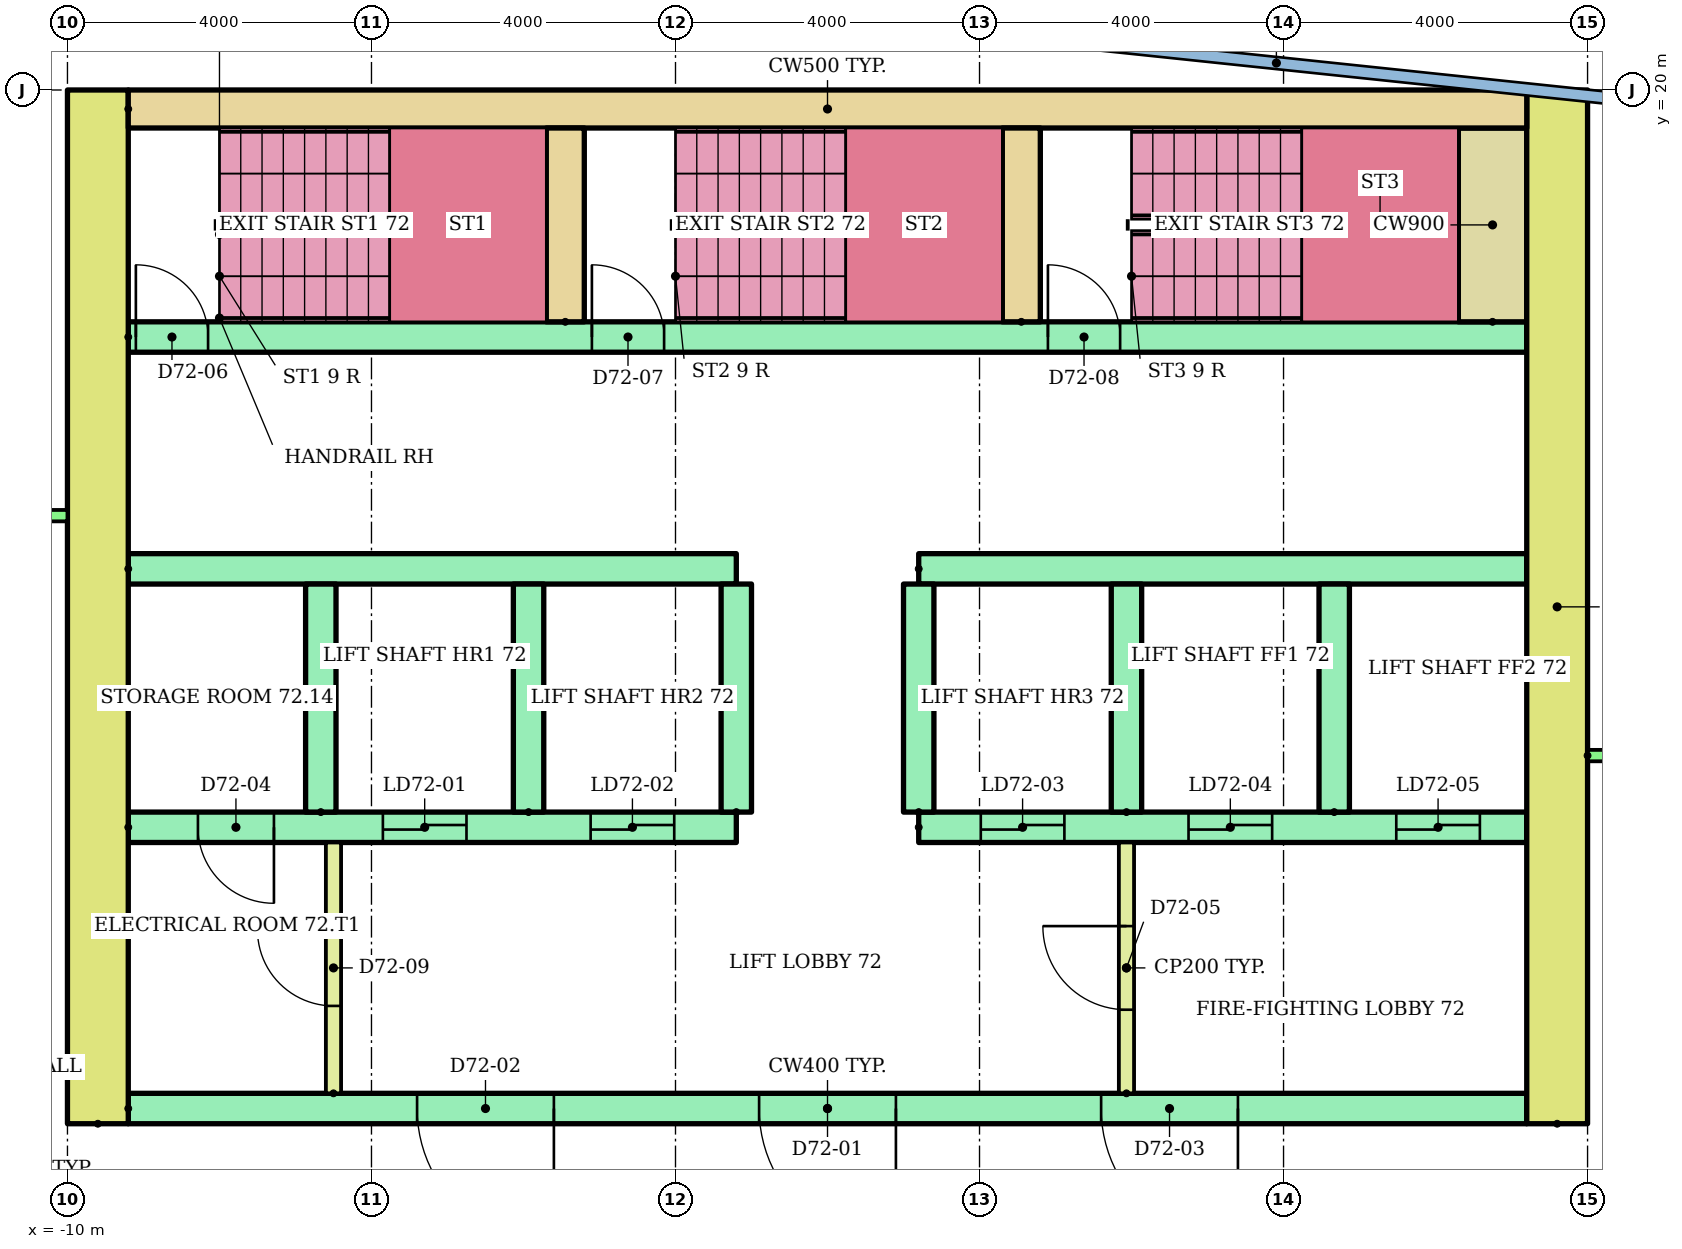
"""IFC4 building model, lengths in metres.
Left out: names, types, materials, properties, quantities, classifications, styles, units other than length and angle.
Written with IfcOpenShell. Run it as: python <this file> out.ifc"""

import sys

from ifc_helpers import new_model, si_unit, direction, frame, frame_2d, origin, place, context, subcontext, project, spatial, rectangle, extrude, element, fill, save


model = new_model("IFC4")
c1 = context("Model", 3, precision=1e-05, world=origin(), true_north=direction((0.0, 1.0)))
c2 = subcontext(c1, "Body", "Model", "MODEL_VIEW")
j1 = project(units=[si_unit("LENGTHUNIT", "METRE"), si_unit("PLANEANGLEUNIT", "RADIAN")], contexts=[c1])
p1 = place(None, origin())
s1 = spatial("IfcSite", under=j1, at=p1, CompositionType="ELEMENT")
p2 = place(p1, origin())
s2 = spatial("IfcBuilding", under=s1, at=p2, CompositionType="ELEMENT")
p3 = place(p2, frame((0.0, 0.0, 275.5)))
s3 = spatial("IfcBuildingStorey", under=s2, at=p3, CompositionType="ELEMENT", Elevation=275.5)
for number, where, z_axis, x_axis in (
    (1, (-9.6, 6.4, 0.0), (0.0, 0.0, 1.0), (0.0, 1.0, 0.0)),
    (2, (9.6, 6.4, 0.0), (0.0, 0.0, 1.0), (0.0, 1.0, 0.0)),
):
    element("IfcWall", number, at=place(p3, frame(where, z_axis=z_axis, x_axis=x_axis)), inside=s3, PredefinedType="SHEAR", context=c2, shape_type="SweptSolid", body=[
        extrude(rectangle(XDim=13.6, YDim=0.8, at=frame_2d((6.8, 0.0))), origin(), (0.0, 0.0, 1.0), 2.92),
    ])
p4 = place(p3, frame((-9.2, 19.75, 0.0)))
e3 = element("IfcWall", 3, at=p4, inside=s3, PredefinedType="SHEAR", context=c2, shape_type="SweptSolid", body=[
    extrude(rectangle(XDim=18.4, YDim=0.5, at=frame_2d((9.2, 0.0))), origin(), (0.0, 0.0, 1.0), 2.92),
])
p5 = place(p3, frame((-9.2, 6.6, 0.0)))
e4 = element("IfcWall", 4, at=p5, inside=s3, PredefinedType="SHEAR", context=c2, shape_type="SweptSolid", body=[
    extrude(rectangle(XDim=18.4, YDim=0.4, at=frame_2d((9.2, 0.0))), origin(), (0.0, 0.0, 1.0), 2.92),
])
p6 = place(p5, frame((8.3, 0.0, 0.0)))
e5 = element("IfcOpeningElement", 5, at=p6, cuts=e4, PredefinedType="OPENING", context=c2, shape_type="SweptSolid", body=[
    extrude(rectangle(XDim=1.8, YDim=2.1, at=frame_2d((0.9, 1.05))), frame((0.0, 0.21, 0.0), z_axis=(0.0, -1.0, 0.0), x_axis=(1.0, 0.0, 0.0)), (0.0, 0.0, 1.0), 0.42),
])
p7 = place(p5, frame((3.8, 0.0, 0.0)))
e6 = element("IfcOpeningElement", 6, at=p7, cuts=e4, PredefinedType="OPENING", context=c2, shape_type="SweptSolid", body=[
    extrude(rectangle(XDim=1.8, YDim=2.1, at=frame_2d((0.9, 1.05))), frame((0.0, 0.21, 0.0), z_axis=(0.0, -1.0, 0.0), x_axis=(1.0, 0.0, 0.0)), (0.0, 0.0, 1.0), 0.42),
])
p8 = place(p5, frame((12.8, 0.0, 0.0)))
e7 = element("IfcOpeningElement", 7, at=p8, cuts=e4, PredefinedType="OPENING", context=c2, shape_type="SweptSolid", body=[
    extrude(rectangle(XDim=1.8, YDim=2.1, at=frame_2d((0.9, 1.05))), frame((0.0, 0.21, 0.0), z_axis=(0.0, -1.0, 0.0), x_axis=(1.0, 0.0, 0.0)), (0.0, 0.0, 1.0), 0.42),
])
p9 = place(p3, frame((-9.2, 10.3, 0.0)))
e8 = element("IfcWall", 8, at=p9, inside=s3, PredefinedType="SHEAR", context=c2, shape_type="SweptSolid", body=[
    extrude(rectangle(XDim=8.0, YDim=0.4, at=frame_2d((4.0, 0.0))), origin(), (0.0, 0.0, 1.0), 2.92),
])
p10 = place(p9, frame((3.35, 0.0, 0.0)))
e9 = element("IfcOpeningElement", 9, at=p10, cuts=e8, PredefinedType="OPENING", context=c2, shape_type="SweptSolid", body=[
    extrude(rectangle(XDim=1.1, YDim=2.1, at=frame_2d((0.55, 1.05))), frame((0.0, 0.21, 0.0), z_axis=(0.0, -1.0, 0.0), x_axis=(1.0, 0.0, 0.0)), (0.0, 0.0, 1.0), 0.42),
])
p11 = place(p9, frame((6.083, 0.0, 0.0)))
e10 = element("IfcOpeningElement", 10, at=p11, cuts=e8, PredefinedType="OPENING", context=c2, shape_type="SweptSolid", body=[
    extrude(rectangle(XDim=1.1, YDim=2.1, at=frame_2d((0.55, 1.05))), frame((0.0, 0.21, 0.0), z_axis=(0.0, -1.0, 0.0), x_axis=(1.0, 0.0, 0.0)), (0.0, 0.0, 1.0), 0.42),
])
p12 = place(p9, frame((0.917, 0.0, 0.0)))
e11 = element("IfcOpeningElement", 11, at=p12, cuts=e8, PredefinedType="OPENING", context=c2, shape_type="SweptSolid", body=[
    extrude(rectangle(XDim=1.0, YDim=2.1, at=frame_2d((0.5, 1.05))), frame((0.0, 0.21, 0.0), z_axis=(0.0, -1.0, 0.0), x_axis=(1.0, 0.0, 0.0)), (0.0, 0.0, 1.0), 0.42),
])
p13 = place(p3, frame((-9.2, 13.7, 0.0)))
e12 = element("IfcWall", 12, at=p13, inside=s3, PredefinedType="SHEAR", context=c2, shape_type="SweptSolid", body=[
    extrude(rectangle(XDim=8.0, YDim=0.4, at=frame_2d((4.0, 0.0))), origin(), (0.0, 0.0, 1.0), 2.92),
])
p14 = place(p3, frame((1.2, 10.3, 0.0)))
e13 = element("IfcWall", 13, at=p14, inside=s3, PredefinedType="SHEAR", context=c2, shape_type="SweptSolid", body=[
    extrude(rectangle(XDim=8.0, YDim=0.4, at=frame_2d((4.0, 0.0))), origin(), (0.0, 0.0, 1.0), 2.92),
])
p15 = place(p14, frame((0.817, 0.0, 0.0)))
e14 = element("IfcOpeningElement", 14, at=p15, cuts=e13, PredefinedType="OPENING", context=c2, shape_type="SweptSolid", body=[
    extrude(rectangle(XDim=1.1, YDim=2.1, at=frame_2d((0.55, 1.05))), frame((0.0, 0.21, 0.0), z_axis=(0.0, -1.0, 0.0), x_axis=(1.0, 0.0, 0.0)), (0.0, 0.0, 1.0), 0.42),
])
p16 = place(p14, frame((3.55, 0.0, 0.0)))
e15 = element("IfcOpeningElement", 15, at=p16, cuts=e13, PredefinedType="OPENING", context=c2, shape_type="SweptSolid", body=[
    extrude(rectangle(XDim=1.1, YDim=2.1, at=frame_2d((0.55, 1.05))), frame((0.0, 0.21, 0.0), z_axis=(0.0, -1.0, 0.0), x_axis=(1.0, 0.0, 0.0)), (0.0, 0.0, 1.0), 0.42),
])
p17 = place(p14, frame((6.283, 0.0, 0.0)))
e16 = element("IfcOpeningElement", 16, at=p17, cuts=e13, PredefinedType="OPENING", context=c2, shape_type="SweptSolid", body=[
    extrude(rectangle(XDim=1.1, YDim=2.1, at=frame_2d((0.55, 1.05))), frame((0.0, 0.21, 0.0), z_axis=(0.0, -1.0, 0.0), x_axis=(1.0, 0.0, 0.0)), (0.0, 0.0, 1.0), 0.42),
])
p18 = place(p3, frame((1.2, 13.7, 0.0)))
e17 = element("IfcWall", 17, at=p18, inside=s3, PredefinedType="SHEAR", context=c2, shape_type="SweptSolid", body=[
    extrude(rectangle(XDim=8.0, YDim=0.4, at=frame_2d((4.0, 0.0))), origin(), (0.0, 0.0, 1.0), 2.92),
])
for number, where, z_axis, x_axis in (
    (18, (-6.667, 10.5, 0.0), (0.0, 0.0, 1.0), (0.0, 1.0, 0.0)),
    (19, (-3.933, 10.5, 0.0), (0.0, 0.0, 1.0), (0.0, 1.0, 0.0)),
    (20, (-1.2, 10.5, 0.0), (0.0, 0.0, 1.0), (0.0, 1.0, 0.0)),
    (21, (1.2, 10.5, 0.0), (0.0, 0.0, 1.0), (0.0, 1.0, 0.0)),
    (22, (3.933, 10.5, 0.0), (0.0, 0.0, 1.0), (0.0, 1.0, 0.0)),
    (23, (6.667, 10.5, 0.0), (0.0, 0.0, 1.0), (0.0, 1.0, 0.0)),
):
    element("IfcWall", number, at=place(p3, frame(where, z_axis=z_axis, x_axis=x_axis)), inside=s3, PredefinedType="SHEAR", context=c2, shape_type="SweptSolid", body=[
        extrude(rectangle(XDim=3.0, YDim=0.4, at=frame_2d((1.5, 0.0))), origin(), (0.0, 0.0, 1.0), 2.92),
    ])
p19 = place(p3, frame((3.933, 6.8, 0.0), z_axis=(0.0, 0.0, 1.0), x_axis=(0.0, 1.0, 0.0)))
e24 = element("IfcWall", 24, at=p19, inside=s3, PredefinedType="PARTITIONING", context=c2, shape_type="SweptSolid", body=[
    extrude(rectangle(XDim=3.3, YDim=0.2, at=frame_2d((1.65, 0.0))), origin(), (0.0, 0.0, 1.0), 2.92),
])
p20 = place(p19, frame((1.1, 0.0, 0.0)))
e25 = element("IfcOpeningElement", 25, at=p20, cuts=e24, PredefinedType="OPENING", context=c2, shape_type="SweptSolid", body=[
    extrude(rectangle(XDim=1.1, YDim=2.1, at=frame_2d((0.55, 1.05))), frame((0.0, 0.11, 0.0), z_axis=(0.0, -1.0, 0.0), x_axis=(1.0, 0.0, 0.0)), (0.0, 0.0, 1.0), 0.22),
])
p21 = place(p3, frame((-9.2, 16.75, 0.0)))
e26 = element("IfcWall", 26, at=p21, inside=s3, PredefinedType="SHEAR", context=c2, shape_type="SweptSolid", body=[
    extrude(rectangle(XDim=18.4, YDim=0.4, at=frame_2d((9.2, 0.0))), origin(), (0.0, 0.0, 1.0), 2.92),
])
p22 = place(p21, frame((0.1, 0.0, 0.0)))
e27 = element("IfcOpeningElement", 27, at=p22, cuts=e26, PredefinedType="OPENING", context=c2, shape_type="SweptSolid", body=[
    extrude(rectangle(XDim=0.95, YDim=2.1, at=frame_2d((0.475, 1.05))), frame((0.0, 0.21, 0.0), z_axis=(0.0, -1.0, 0.0), x_axis=(1.0, 0.0, 0.0)), (0.0, 0.0, 1.0), 0.42),
])
p23 = place(p21, frame((6.1, 0.0, 0.0)))
e28 = element("IfcOpeningElement", 28, at=p23, cuts=e26, PredefinedType="OPENING", context=c2, shape_type="SweptSolid", body=[
    extrude(rectangle(XDim=0.95, YDim=2.1, at=frame_2d((0.475, 1.05))), frame((0.0, 0.21, 0.0), z_axis=(0.0, -1.0, 0.0), x_axis=(1.0, 0.0, 0.0)), (0.0, 0.0, 1.0), 0.42),
])
p24 = place(p21, frame((12.1, 0.0, 0.0)))
e29 = element("IfcOpeningElement", 29, at=p24, cuts=e26, PredefinedType="OPENING", context=c2, shape_type="SweptSolid", body=[
    extrude(rectangle(XDim=0.95, YDim=2.1, at=frame_2d((0.475, 1.05))), frame((0.0, 0.21, 0.0), z_axis=(0.0, -1.0, 0.0), x_axis=(1.0, 0.0, 0.0)), (0.0, 0.0, 1.0), 0.42),
])
for number, where, z_axis, x_axis in (
    (30, (-3.45, 16.95, 0.0), (0.0, 0.0, 1.0), (0.0, 1.0, 0.0)),
    (31, (2.55, 16.95, 0.0), (0.0, 0.0, 1.0), (0.0, 1.0, 0.0)),
):
    element("IfcWall", number, at=place(p3, frame(where, z_axis=z_axis, x_axis=x_axis)), inside=s3, PredefinedType="SHEAR", context=c2, shape_type="SweptSolid", body=[
        extrude(rectangle(XDim=2.55, YDim=0.5, at=frame_2d((1.275, 0.0))), origin(), (0.0, 0.0, 1.0), 2.92),
    ])
p25 = place(p3, frame((8.75, 16.95, 0.0), z_axis=(0.0, 0.0, 1.0), x_axis=(0.0, 1.0, 0.0)))
e32 = element("IfcWall", 32, at=p25, inside=s3, PredefinedType="SHEAR", context=c2, shape_type="SweptSolid", body=[
    extrude(rectangle(XDim=2.55, YDim=0.9, at=frame_2d((1.275, 0.0))), origin(), (0.0, 0.0, 1.0), 2.92),
])
p26 = place(p3, frame((-6.5, 6.8, 0.0), z_axis=(0.0, 0.0, 1.0), x_axis=(0.0, 1.0, 0.0)))
e33 = element("IfcWall", 33, at=p26, inside=s3, PredefinedType="PARTITIONING", context=c2, shape_type="SweptSolid", body=[
    extrude(rectangle(XDim=3.3, YDim=0.2, at=frame_2d((1.65, 0.0))), origin(), (0.0, 0.0, 1.0), 2.92),
])
p27 = place(p26, frame((1.15, 0.0, 0.0)))
e34 = element("IfcOpeningElement", 34, at=p27, cuts=e33, PredefinedType="OPENING", context=c2, shape_type="SweptSolid", body=[
    extrude(rectangle(XDim=1.0, YDim=2.1, at=frame_2d((0.5, 1.05))), frame((0.0, 0.11, 0.0), z_axis=(0.0, -1.0, 0.0), x_axis=(1.0, 0.0, 0.0)), (0.0, 0.0, 1.0), 0.22),
])
p28 = place(p3, frame((-21.89, 14.4, 0.0)))
e35 = element("IfcWall", 35, at=p28, inside=s3, PredefinedType="PARTITIONING", context=c2, shape_type="SweptSolid", body=[
    extrude(rectangle(XDim=11.89, YDim=0.15, at=frame_2d((5.945, 0.0))), origin(), (0.0, 0.0, 1.0), 2.4),
])
p29 = place(p28, frame((1.26, 0.0, 0.0)))
e36 = element("IfcOpeningElement", 36, at=p29, cuts=e35, PredefinedType="OPENING", context=c2, shape_type="SweptSolid", body=[
    extrude(rectangle(XDim=1.0, YDim=2.1, at=frame_2d((0.5, 1.05))), frame((0.0, 0.085, 0.0), z_axis=(0.0, -1.0, 0.0), x_axis=(1.0, 0.0, 0.0)), (0.0, 0.0, 1.0), 0.17),
])
p30 = place(p28, frame((8.254, 0.0, 0.0)))
e37 = element("IfcOpeningElement", 37, at=p30, cuts=e35, PredefinedType="OPENING", context=c2, shape_type="SweptSolid", body=[
    extrude(rectangle(XDim=1.0, YDim=2.1, at=frame_2d((0.5, 1.05))), frame((0.0, 0.085, 0.0), z_axis=(0.0, -1.0, 0.0), x_axis=(1.0, 0.0, 0.0)), (0.0, 0.0, 1.0), 0.17),
])
p31 = place(p3, frame((10.0, 11.243, 0.0)))
e38 = element("IfcWall", 38, at=p31, inside=s3, PredefinedType="PARTITIONING", context=c2, shape_type="SweptSolid", body=[
    extrude(rectangle(XDim=22.118, YDim=0.15, at=frame_2d((11.059, 0.0))), origin(), (0.0, 0.0, 1.0), 2.4),
])
p32 = place(p31, frame((7.398, 0.0, 0.0)))
e39 = element("IfcOpeningElement", 39, at=p32, cuts=e38, PredefinedType="OPENING", context=c2, shape_type="SweptSolid", body=[
    extrude(rectangle(XDim=1.0, YDim=2.1, at=frame_2d((0.5, 1.05))), frame((0.0, 0.085, 0.0), z_axis=(0.0, -1.0, 0.0), x_axis=(1.0, 0.0, 0.0)), (0.0, 0.0, 1.0), 0.17),
])
p33 = place(p31, frame((18.477, 0.0, 0.0)))
e40 = element("IfcOpeningElement", 40, at=p33, cuts=e38, PredefinedType="OPENING", context=c2, shape_type="SweptSolid", body=[
    extrude(rectangle(XDim=0.9, YDim=2.1, at=frame_2d((0.45, 1.05))), frame((0.0, 0.085, 0.0), z_axis=(0.0, -1.0, 0.0), x_axis=(1.0, 0.0, 0.0)), (0.0, 0.0, 1.0), 0.17),
])
p34 = place(p6, frame((1.8, 0.0, 0.0), z_axis=(0.0, 0.0, 1.0), x_axis=(-1.0, 0.0, 0.0)))
e41 = element("IfcDoor", 41, at=p34, inside=s3, OperationType="DOUBLE_DOOR_SINGLE_SWING", PredefinedType="DOOR", context=c2, shape_type="SweptSolid", body=[
    extrude(rectangle(XDim=1.8, YDim=2.1, at=frame_2d((0.9, 1.05))), frame((0.0, 0.025, 0.0), z_axis=(0.0, -1.0, 0.0), x_axis=(1.0, 0.0, 0.0)), (0.0, 0.0, 1.0), 0.05),
])
fill(e5, e41)
p35 = place(p7, frame((1.8, 0.0, 0.0), z_axis=(0.0, 0.0, 1.0), x_axis=(-1.0, 0.0, 0.0)))
e42 = element("IfcDoor", 42, at=p35, inside=s3, OperationType="DOUBLE_DOOR_SINGLE_SWING", PredefinedType="DOOR", context=c2, shape_type="SweptSolid", body=[
    extrude(rectangle(XDim=1.8, YDim=2.1, at=frame_2d((0.9, 1.05))), frame((0.0, 0.025, 0.0), z_axis=(0.0, -1.0, 0.0), x_axis=(1.0, 0.0, 0.0)), (0.0, 0.0, 1.0), 0.05),
])
fill(e6, e42)
p36 = place(p8, frame((1.8, 0.0, 0.0), z_axis=(0.0, 0.0, 1.0), x_axis=(-1.0, 0.0, 0.0)))
e43 = element("IfcDoor", 43, at=p36, inside=s3, OperationType="DOUBLE_DOOR_SINGLE_SWING", PredefinedType="DOOR", context=c2, shape_type="SweptSolid", body=[
    extrude(rectangle(XDim=1.8, YDim=2.1, at=frame_2d((0.9, 1.05))), frame((0.0, 0.025, 0.0), z_axis=(0.0, -1.0, 0.0), x_axis=(1.0, 0.0, 0.0)), (0.0, 0.0, 1.0), 0.05),
])
fill(e7, e43)
p37 = place(p10, origin())
e44 = element("IfcDoor", 44, at=p37, inside=s3, OperationType="SLIDING_TO_LEFT", PredefinedType="DOOR", context=c2, shape_type="SweptSolid", body=[
    extrude(rectangle(XDim=1.1, YDim=2.1, at=frame_2d((0.55, 1.05))), frame((0.0, 0.025, 0.0), z_axis=(0.0, -1.0, 0.0), x_axis=(1.0, 0.0, 0.0)), (0.0, 0.0, 1.0), 0.05),
])
fill(e9, e44)
p38 = place(p11, origin())
e45 = element("IfcDoor", 45, at=p38, inside=s3, OperationType="SLIDING_TO_LEFT", PredefinedType="DOOR", context=c2, shape_type="SweptSolid", body=[
    extrude(rectangle(XDim=1.1, YDim=2.1, at=frame_2d((0.55, 1.05))), frame((0.0, 0.025, 0.0), z_axis=(0.0, -1.0, 0.0), x_axis=(1.0, 0.0, 0.0)), (0.0, 0.0, 1.0), 0.05),
])
fill(e10, e45)
p39 = place(p15, origin())
e46 = element("IfcDoor", 46, at=p39, inside=s3, OperationType="SLIDING_TO_LEFT", PredefinedType="DOOR", context=c2, shape_type="SweptSolid", body=[
    extrude(rectangle(XDim=1.1, YDim=2.1, at=frame_2d((0.55, 1.05))), frame((0.0, 0.025, 0.0), z_axis=(0.0, -1.0, 0.0), x_axis=(1.0, 0.0, 0.0)), (0.0, 0.0, 1.0), 0.05),
])
fill(e14, e46)
p40 = place(p16, origin())
e47 = element("IfcDoor", 47, at=p40, inside=s3, OperationType="SLIDING_TO_LEFT", PredefinedType="DOOR", context=c2, shape_type="SweptSolid", body=[
    extrude(rectangle(XDim=1.1, YDim=2.1, at=frame_2d((0.55, 1.05))), frame((0.0, 0.025, 0.0), z_axis=(0.0, -1.0, 0.0), x_axis=(1.0, 0.0, 0.0)), (0.0, 0.0, 1.0), 0.05),
])
fill(e15, e47)
p41 = place(p17, origin())
e48 = element("IfcDoor", 48, at=p41, inside=s3, OperationType="SLIDING_TO_LEFT", PredefinedType="DOOR", context=c2, shape_type="SweptSolid", body=[
    extrude(rectangle(XDim=1.1, YDim=2.1, at=frame_2d((0.55, 1.05))), frame((0.0, 0.025, 0.0), z_axis=(0.0, -1.0, 0.0), x_axis=(1.0, 0.0, 0.0)), (0.0, 0.0, 1.0), 0.05),
])
fill(e16, e48)
p42 = place(p12, frame((1.0, 0.0, 0.0), z_axis=(0.0, 0.0, 1.0), x_axis=(-1.0, 0.0, 0.0)))
e49 = element("IfcDoor", 49, at=p42, inside=s3, OperationType="SINGLE_SWING_RIGHT", PredefinedType="DOOR", context=c2, shape_type="SweptSolid", body=[
    extrude(rectangle(XDim=1.0, YDim=2.1, at=frame_2d((0.5, 1.05))), frame((0.0, 0.025, 0.0), z_axis=(0.0, -1.0, 0.0), x_axis=(1.0, 0.0, 0.0)), (0.0, 0.0, 1.0), 0.05),
])
fill(e11, e49)
p43 = place(p20, origin())
e50 = element("IfcDoor", 50, at=p43, inside=s3, OperationType="SINGLE_SWING_RIGHT", PredefinedType="DOOR", context=c2, shape_type="SweptSolid", body=[
    extrude(rectangle(XDim=1.1, YDim=2.1, at=frame_2d((0.55, 1.05))), frame((0.0, 0.025, 0.0), z_axis=(0.0, -1.0, 0.0), x_axis=(1.0, 0.0, 0.0)), (0.0, 0.0, 1.0), 0.05),
])
fill(e25, e50)
p44 = place(p22, origin())
e51 = element("IfcDoor", 51, at=p44, inside=s3, OperationType="SINGLE_SWING_LEFT", PredefinedType="DOOR", context=c2, shape_type="SweptSolid", body=[
    extrude(rectangle(XDim=0.95, YDim=2.1, at=frame_2d((0.475, 1.05))), frame((0.0, 0.025, 0.0), z_axis=(0.0, -1.0, 0.0), x_axis=(1.0, 0.0, 0.0)), (0.0, 0.0, 1.0), 0.05),
])
fill(e27, e51)
p45 = place(p23, origin())
e52 = element("IfcDoor", 52, at=p45, inside=s3, OperationType="SINGLE_SWING_LEFT", PredefinedType="DOOR", context=c2, shape_type="SweptSolid", body=[
    extrude(rectangle(XDim=0.95, YDim=2.1, at=frame_2d((0.475, 1.05))), frame((0.0, 0.025, 0.0), z_axis=(0.0, -1.0, 0.0), x_axis=(1.0, 0.0, 0.0)), (0.0, 0.0, 1.0), 0.05),
])
fill(e28, e52)
p46 = place(p24, origin())
e53 = element("IfcDoor", 53, at=p46, inside=s3, OperationType="SINGLE_SWING_LEFT", PredefinedType="DOOR", context=c2, shape_type="SweptSolid", body=[
    extrude(rectangle(XDim=0.95, YDim=2.1, at=frame_2d((0.475, 1.05))), frame((0.0, 0.025, 0.0), z_axis=(0.0, -1.0, 0.0), x_axis=(1.0, 0.0, 0.0)), (0.0, 0.0, 1.0), 0.05),
])
fill(e29, e53)
p47 = place(p27, origin())
e54 = element("IfcDoor", 54, at=p47, inside=s3, OperationType="SINGLE_SWING_RIGHT", PredefinedType="DOOR", context=c2, shape_type="SweptSolid", body=[
    extrude(rectangle(XDim=1.0, YDim=2.1, at=frame_2d((0.5, 1.05))), frame((0.0, 0.025, 0.0), z_axis=(0.0, -1.0, 0.0), x_axis=(1.0, 0.0, 0.0)), (0.0, 0.0, 1.0), 0.05),
])
fill(e34, e54)
save(model, sys.argv[1])
